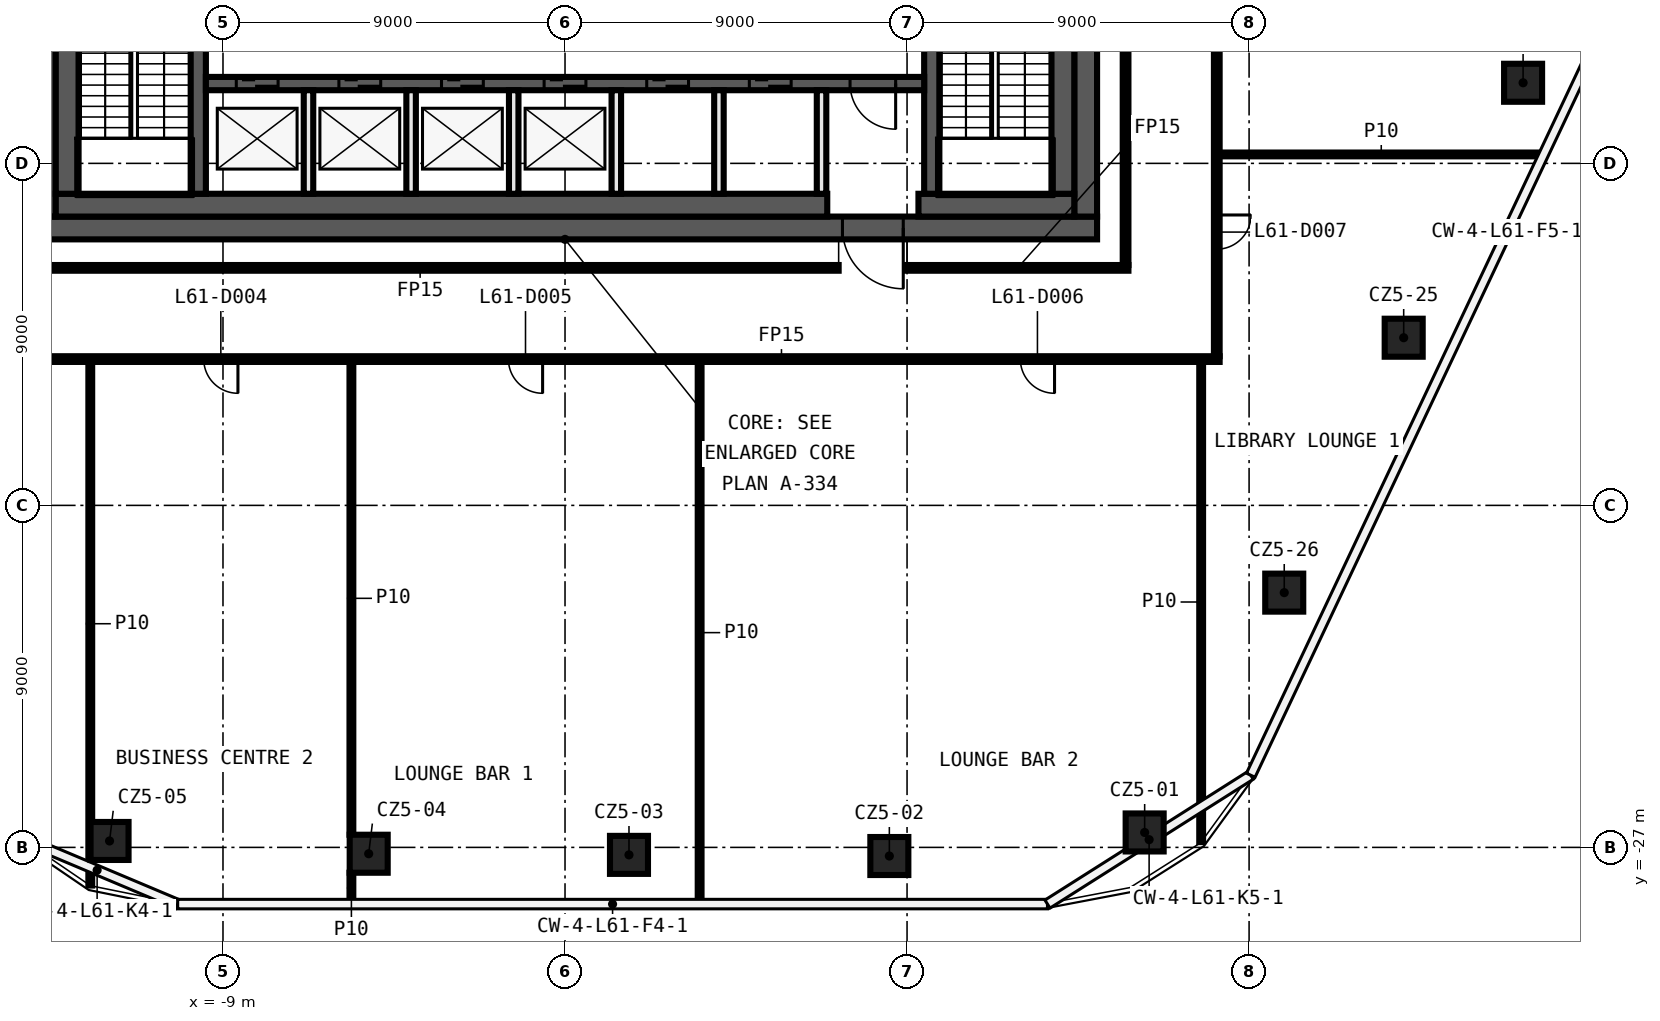
"""IFC4 building model, lengths in metres.
Left out: names, types, materials, properties, quantities, classifications, styles, units other than length and angle.
Written with IfcOpenShell. Run it as: python <this file> out.ifc"""

import sys

from ifc_helpers import new_model, si_unit, direction, frame, frame_2d, origin, origin_2d, place, context, subcontext, project, spatial, rectangle, extrude, element, fill, save


model = new_model("IFC4")
c1 = context("Model", 3, precision=1e-05, world=origin(), true_north=direction((0.0, 1.0)))
c2 = subcontext(c1, "Body", "Model", "MODEL_VIEW")
j1 = project(units=[si_unit("LENGTHUNIT", "METRE"), si_unit("PLANEANGLEUNIT", "RADIAN")], contexts=[c1])
p1 = place(None, origin())
s1 = spatial("IfcSite", under=j1, at=p1, CompositionType="ELEMENT")
p2 = place(p1, origin())
s2 = spatial("IfcBuilding", under=s1, at=p2, CompositionType="ELEMENT")
p3 = place(p2, frame((0.0, 0.0, 289.2)))
s3 = spatial("IfcBuildingStorey", under=s2, at=p3, CompositionType="ELEMENT", Elevation=289.2)
for number, where, z_axis, x_axis in (
    (1, (15.252, -26.607, 0.0), (0.0, 0.0, 1.0), (1.0, 0.0, 0.0)),
    (2, (8.534, -27.227, 0.0), (0.0, 0.0, 1.0), (1.0, 0.0, 0.0)),
    (3, (1.683, -27.197, 0.0), (0.0, 0.0, 1.0), (1.0, 0.0, 0.0)),
    (4, (-5.166, -27.167, 0.0), (0.0, 0.0, 1.0), (1.0, 0.0, 0.0)),
    (5, (-11.985, -26.831, 0.0), (0.0, 0.0, 1.0), (1.0, 0.0, 0.0)),
    (6, (25.21, -6.879, 0.0), (0.0, 0.0, 1.0), (1.0, 0.0, 0.0)),
    (7, (22.068, -13.588, 0.0), (0.0, 0.0, 1.0), (1.0, 0.0, 0.0)),
    (8, (18.925, -20.296, 0.0), (0.0, 0.0, 1.0), (1.0, 0.0, 0.0)),
):
    element("IfcColumn", number, at=place(p3, frame(where, z_axis=z_axis, x_axis=x_axis)), inside=s3, PredefinedType="COLUMN", context=c2, shape_type="SweptSolid", body=[
        extrude(rectangle(XDim=1.0, YDim=1.0, at=origin_2d()), origin(), (0.0, 0.0, 1.0), 4.62),
    ])
p4 = place(p3, frame((17.225, -14.15, 0.0), z_axis=(0.0, 0.0, 1.0), x_axis=(-1.0, 0.0, 0.0)))
e9 = element("IfcWall", 9, at=p4, inside=s3, PredefinedType="PARTITIONING", context=c2, shape_type="SweptSolid", body=[
    extrude(rectangle(XDim=34.45, YDim=0.15, at=frame_2d((17.225, 0.0))), origin(), (0.0, 0.0, 1.0), 4.62),
])
p5 = place(p4, frame((31.596, 0.0, 0.0)))
e10 = element("IfcOpeningElement", 10, at=p5, cuts=e9, PredefinedType="OPENING", context=c2, shape_type="SweptSolid", body=[
    extrude(rectangle(XDim=0.9, YDim=2.1, at=frame_2d((0.45, 1.05))), frame((0.0, 0.085, 0.0), z_axis=(0.0, -1.0, 0.0), x_axis=(1.0, 0.0, 0.0)), (0.0, 0.0, 1.0), 0.17),
])
p6 = place(p4, frame((25.832, 0.0, 0.0)))
e11 = element("IfcOpeningElement", 11, at=p6, cuts=e9, PredefinedType="OPENING", context=c2, shape_type="SweptSolid", body=[
    extrude(rectangle(XDim=0.9, YDim=2.1, at=frame_2d((0.45, 1.05))), frame((0.0, 0.085, 0.0), z_axis=(0.0, -1.0, 0.0), x_axis=(1.0, 0.0, 0.0)), (0.0, 0.0, 1.0), 0.17),
])
p7 = place(p4, frame((17.815, 0.0, 0.0)))
e12 = element("IfcOpeningElement", 12, at=p7, cuts=e9, PredefinedType="OPENING", context=c2, shape_type="SweptSolid", body=[
    extrude(rectangle(XDim=0.9, YDim=2.1, at=frame_2d((0.45, 1.05))), frame((0.0, 0.085, 0.0), z_axis=(0.0, -1.0, 0.0), x_axis=(1.0, 0.0, 0.0)), (0.0, 0.0, 1.0), 0.17),
])
p8 = place(p4, frame((4.344, 0.0, 0.0)))
e13 = element("IfcOpeningElement", 13, at=p8, cuts=e9, PredefinedType="OPENING", context=c2, shape_type="SweptSolid", body=[
    extrude(rectangle(XDim=0.9, YDim=2.1, at=frame_2d((0.45, 1.05))), frame((0.0, 0.085, 0.0), z_axis=(0.0, -1.0, 0.0), x_axis=(1.0, 0.0, 0.0)), (0.0, 0.0, 1.0), 0.17),
])
p9 = place(p3, frame((-14.825, -11.75, 0.0), z_axis=(0.0, 0.0, 1.0), x_axis=(1.0, 0.0, 0.0)))
e14 = element("IfcWall", 14, at=p9, inside=s3, PredefinedType="PARTITIONING", context=c2, shape_type="SweptSolid", body=[
    extrude(rectangle(XDim=22.025, YDim=0.15, at=frame_2d((11.012, 0.0))), origin(), (0.0, 0.0, 1.0), 4.62),
])
p10 = place(p3, frame((9.0, -11.75, 0.0), z_axis=(0.0, 0.0, 1.0), x_axis=(1.0, 0.0, 0.0)))
e15 = element("IfcWall", 15, at=p10, inside=s3, PredefinedType="PARTITIONING", context=c2, shape_type="SweptSolid", body=[
    extrude(rectangle(XDim=5.825, YDim=0.15, at=frame_2d((2.913, 0.0))), origin(), (0.0, 0.0, 1.0), 4.62),
])
p11 = place(p3, frame((17.225, -8.765, 0.0), z_axis=(0.0, 0.0, 1.0), x_axis=(1.0, 0.0, 0.0)))
e16 = element("IfcWall", 16, at=p11, inside=s3, PredefinedType="PARTITIONING", context=c2, shape_type="SweptSolid", body=[
    extrude(rectangle(XDim=8.505, YDim=0.1, at=frame_2d((4.253, 0.0))), origin(), (0.0, 0.0, 1.0), 4.62),
])
p12 = place(p3, frame((17.15, 14.075, 0.0), z_axis=(0.0, 0.0, 1.0), x_axis=(0.0, -1.0, 0.0)))
e17 = element("IfcWall", 17, at=p12, inside=s3, PredefinedType="PARTITIONING", context=c2, shape_type="SweptSolid", body=[
    extrude(rectangle(XDim=28.15, YDim=0.15, at=frame_2d((14.075, 0.0))), origin(), (0.0, 0.0, 1.0), 4.62),
])
p13 = place(p12, frame((24.433, 0.0, 0.0)))
e18 = element("IfcOpeningElement", 18, at=p13, cuts=e17, PredefinedType="OPENING", context=c2, shape_type="SweptSolid", body=[
    extrude(rectangle(XDim=0.9, YDim=2.1, at=frame_2d((0.45, 1.05))), frame((0.0, 0.085, 0.0), z_axis=(0.0, -1.0, 0.0), x_axis=(1.0, 0.0, 0.0)), (0.0, 0.0, 1.0), 0.17),
])
p14 = place(p12, frame((18.304, 0.0, 0.0)))
e19 = element("IfcOpeningElement", 19, at=p14, cuts=e17, PredefinedType="OPENING", context=c2, shape_type="SweptSolid", body=[
    extrude(rectangle(XDim=0.9, YDim=2.1, at=frame_2d((0.45, 1.05))), frame((0.0, 0.085, 0.0), z_axis=(0.0, -1.0, 0.0), x_axis=(1.0, 0.0, 0.0)), (0.0, 0.0, 1.0), 0.17),
])
p15 = place(p3, frame((16.739, -26.86, 0.0), z_axis=(0.0, 0.0, 1.0), x_axis=(0.0, 1.0, 0.0)))
e20 = element("IfcWall", 20, at=p15, inside=s3, PredefinedType="PARTITIONING", context=c2, shape_type="SweptSolid", body=[
    extrude(rectangle(XDim=12.635, YDim=0.1, at=frame_2d((6.318, 0.0))), origin(), (0.0, 0.0, 1.0), 4.62),
])
p16 = place(p3, frame((14.75, -11.675, 0.0), z_axis=(0.0, 0.0, 1.0), x_axis=(0.0, 1.0, 0.0)))
e21 = element("IfcWall", 21, at=p16, inside=s3, PredefinedType="PARTITIONING", context=c2, shape_type="SweptSolid", body=[
    extrude(rectangle(XDim=23.35, YDim=0.15, at=frame_2d((11.675, 0.0))), origin(), (0.0, 0.0, 1.0), 4.62),
])
p17 = place(p16, frame((11.225, 0.0, 0.0)))
e22 = element("IfcOpeningElement", 22, at=p17, cuts=e21, PredefinedType="OPENING", context=c2, shape_type="SweptSolid", body=[
    extrude(rectangle(XDim=0.9, YDim=2.1, at=frame_2d((0.45, 1.05))), frame((0.0, 0.085, 0.0), z_axis=(0.0, -1.0, 0.0), x_axis=(1.0, 0.0, 0.0)), (0.0, 0.0, 1.0), 0.17),
])
p18 = place(p3, frame((3.542, -28.472, 0.0), z_axis=(0.0, 0.0, 1.0), x_axis=(0.0, 1.0, 0.0)))
e23 = element("IfcWall", 23, at=p18, inside=s3, PredefinedType="PARTITIONING", context=c2, shape_type="SweptSolid", body=[
    extrude(rectangle(XDim=14.247, YDim=0.1, at=frame_2d((7.124, 0.0))), origin(), (0.0, 0.0, 1.0), 4.62),
])
p19 = place(p3, frame((-5.621, -28.472, 0.0), z_axis=(0.0, 0.0, 1.0), x_axis=(0.0, 1.0, 0.0)))
e24 = element("IfcWall", 24, at=p19, inside=s3, PredefinedType="PARTITIONING", context=c2, shape_type="SweptSolid", body=[
    extrude(rectangle(XDim=0.805, YDim=0.1, at=frame_2d((0.403, 0.0))), origin(), (0.0, 0.0, 1.0), 4.62),
])
p20 = place(p3, frame((-5.621, -26.667, 0.0), z_axis=(0.0, 0.0, 1.0), x_axis=(0.0, 1.0, 0.0)))
e25 = element("IfcWall", 25, at=p20, inside=s3, PredefinedType="PARTITIONING", context=c2, shape_type="SweptSolid", body=[
    extrude(rectangle(XDim=12.442, YDim=0.1, at=frame_2d((6.221, 0.0))), origin(), (0.0, 0.0, 1.0), 4.62),
])
p21 = place(p3, frame((-12.492, -28.004, 0.0), z_axis=(0.0, 0.0, 1.0), x_axis=(0.0, 1.0, 0.0)))
e26 = element("IfcWall", 26, at=p21, inside=s3, PredefinedType="PARTITIONING", context=c2, shape_type="SweptSolid", body=[
    extrude(rectangle(XDim=13.779, YDim=0.1, at=frame_2d((6.889, 0.0))), origin(), (0.0, 0.0, 1.0), 4.62),
])
p22 = place(p3, frame((14.0, -10.7, 0.0), z_axis=(0.0, 0.0, 1.0), x_axis=(-1.0, 0.0, 0.0)))
e27 = element("IfcWall", 27, at=p22, inside=s3, PredefinedType="SHEAR", context=c2, shape_type="SweptSolid", body=[
    extrude(rectangle(XDim=28.0, YDim=0.6, at=frame_2d((14.0, 0.0))), origin(), (0.0, 0.0, 1.0), 4.62),
])
p23 = place(p22, frame((5.1, 0.0, 0.0)))
e28 = element("IfcOpeningElement", 28, at=p23, cuts=e27, PredefinedType="OPENING", context=c2, shape_type="SweptSolid", body=[
    extrude(rectangle(XDim=1.6, YDim=2.1, at=frame_2d((0.8, 1.05))), frame((0.0, 0.31, 0.0), z_axis=(0.0, -1.0, 0.0), x_axis=(1.0, 0.0, 0.0)), (0.0, 0.0, 1.0), 0.62),
])
for number, where, z_axis, x_axis in (
    (29, (13.7, 10.4, 0.0), (0.0, 0.0, 1.0), (0.0, -1.0, 0.0)),
    (30, (-13.7, -10.4, 0.0), (0.0, 0.0, 1.0), (0.0, 1.0, 0.0)),
):
    element("IfcWall", number, at=place(p3, frame(where, z_axis=z_axis, x_axis=x_axis)), inside=s3, PredefinedType="SHEAR", context=c2, shape_type="SweptSolid", body=[
        extrude(rectangle(XDim=20.8, YDim=0.6, at=frame_2d((10.4, 0.0))), origin(), (0.0, 0.0, 1.0), 4.62),
    ])
p24 = place(p3, frame((13.4, -10.1, 0.0), z_axis=(0.0, 0.0, 1.0), x_axis=(-1.0, 0.0, 0.0)))
e31 = element("IfcWall", 31, at=p24, inside=s3, PredefinedType="SHEAR", context=c2, shape_type="SweptSolid", body=[
    extrude(rectangle(XDim=4.1, YDim=0.6, at=frame_2d((2.05, 0.0))), origin(), (0.0, 0.0, 1.0), 4.62),
])
p25 = place(p3, frame((6.9, -10.1, 0.0), z_axis=(0.0, 0.0, 1.0), x_axis=(-1.0, 0.0, 0.0)))
e32 = element("IfcWall", 32, at=p25, inside=s3, PredefinedType="SHEAR", context=c2, shape_type="SweptSolid", body=[
    extrude(rectangle(XDim=20.3, YDim=0.6, at=frame_2d((10.15, 0.0))), origin(), (0.0, 0.0, 1.0), 4.62),
])
for number, where, z_axis, x_axis in (
    (33, (13.1, 9.8, 0.0), (0.0, 0.0, 1.0), (0.0, -1.0, 0.0)),
    (34, (-13.1, -9.8, 0.0), (0.0, 0.0, 1.0), (0.0, 1.0, 0.0)),
):
    element("IfcWall", number, at=place(p3, frame(where, z_axis=z_axis, x_axis=x_axis)), inside=s3, PredefinedType="SHEAR", context=c2, shape_type="SweptSolid", body=[
        extrude(rectangle(XDim=19.6, YDim=0.6, at=frame_2d((9.8, 0.0))), origin(), (0.0, 0.0, 1.0), 4.62),
    ])
p26 = place(p3, frame((9.65, -2.3, 0.0), z_axis=(0.0, 0.0, 1.0), x_axis=(0.0, -1.0, 0.0)))
e35 = element("IfcWall", 35, at=p26, inside=s3, PredefinedType="SHEAR", context=c2, shape_type="SweptSolid", body=[
    extrude(rectangle(XDim=7.5, YDim=0.4, at=frame_2d((3.75, 0.0))), origin(), (0.0, 0.0, 1.0), 4.62),
])
p27 = place(p26, frame((1.2, 0.0, 0.0)))
e36 = element("IfcOpeningElement", 36, at=p27, cuts=e35, PredefinedType="OPENING", context=c2, shape_type="SweptSolid", body=[
    extrude(rectangle(XDim=1.2, YDim=2.1, at=frame_2d((0.6, 1.05))), frame((0.0, 0.21, 0.0), z_axis=(0.0, -1.0, 0.0), x_axis=(1.0, 0.0, 0.0)), (0.0, 0.0, 1.0), 0.42),
])
p28 = place(p3, frame((-9.65, -9.8, 0.0), z_axis=(0.0, 0.0, 1.0), x_axis=(0.0, 1.0, 0.0)))
e37 = element("IfcWall", 37, at=p28, inside=s3, PredefinedType="SHEAR", context=c2, shape_type="SweptSolid", body=[
    extrude(rectangle(XDim=7.5, YDim=0.4, at=frame_2d((3.75, 0.0))), origin(), (0.0, 0.0, 1.0), 4.62),
])
p29 = place(p28, frame((5.1, 0.0, 0.0)))
e38 = element("IfcOpeningElement", 38, at=p29, cuts=e37, PredefinedType="OPENING", context=c2, shape_type="SweptSolid", body=[
    extrude(rectangle(XDim=1.2, YDim=2.1, at=frame_2d((0.6, 1.05))), frame((0.0, 0.21, 0.0), z_axis=(0.0, -1.0, 0.0), x_axis=(1.0, 0.0, 0.0)), (0.0, 0.0, 1.0), 0.42),
])
p30 = place(p3, frame((9.45, -6.9, 0.0), z_axis=(0.0, 0.0, 1.0), x_axis=(-1.0, 0.0, 0.0)))
e39 = element("IfcWall", 39, at=p30, inside=s3, PredefinedType="SHEAR", context=c2, shape_type="SweptSolid", body=[
    extrude(rectangle(XDim=18.9, YDim=0.35, at=frame_2d((9.45, 0.0))), origin(), (0.0, 0.0, 1.0), 4.62),
])
p31 = place(p30, frame((17.0, 0.0, 0.0)))
e40 = element("IfcOpeningElement", 40, at=p31, cuts=e39, PredefinedType="OPENING", context=c2, shape_type="SweptSolid", body=[
    extrude(rectangle(XDim=1.1, YDim=2.1, at=frame_2d((0.55, 1.05))), frame((0.0, 0.185, 0.0), z_axis=(0.0, -1.0, 0.0), x_axis=(1.0, 0.0, 0.0)), (0.0, 0.0, 1.0), 0.37),
])
p32 = place(p30, frame((14.3, 0.0, 0.0)))
e41 = element("IfcOpeningElement", 41, at=p32, cuts=e39, PredefinedType="OPENING", context=c2, shape_type="SweptSolid", body=[
    extrude(rectangle(XDim=1.1, YDim=2.1, at=frame_2d((0.55, 1.05))), frame((0.0, 0.185, 0.0), z_axis=(0.0, -1.0, 0.0), x_axis=(1.0, 0.0, 0.0)), (0.0, 0.0, 1.0), 0.37),
])
p33 = place(p30, frame((11.6, 0.0, 0.0)))
e42 = element("IfcOpeningElement", 42, at=p33, cuts=e39, PredefinedType="OPENING", context=c2, shape_type="SweptSolid", body=[
    extrude(rectangle(XDim=1.1, YDim=2.1, at=frame_2d((0.55, 1.05))), frame((0.0, 0.185, 0.0), z_axis=(0.0, -1.0, 0.0), x_axis=(1.0, 0.0, 0.0)), (0.0, 0.0, 1.0), 0.37),
])
p34 = place(p30, frame((8.9, 0.0, 0.0)))
e43 = element("IfcOpeningElement", 43, at=p34, cuts=e39, PredefinedType="OPENING", context=c2, shape_type="SweptSolid", body=[
    extrude(rectangle(XDim=1.1, YDim=2.1, at=frame_2d((0.55, 1.05))), frame((0.0, 0.185, 0.0), z_axis=(0.0, -1.0, 0.0), x_axis=(1.0, 0.0, 0.0)), (0.0, 0.0, 1.0), 0.37),
])
p35 = place(p30, frame((6.2, 0.0, 0.0)))
e44 = element("IfcOpeningElement", 44, at=p35, cuts=e39, PredefinedType="OPENING", context=c2, shape_type="SweptSolid", body=[
    extrude(rectangle(XDim=1.1, YDim=2.1, at=frame_2d((0.55, 1.05))), frame((0.0, 0.185, 0.0), z_axis=(0.0, -1.0, 0.0), x_axis=(1.0, 0.0, 0.0)), (0.0, 0.0, 1.0), 0.37),
])
p36 = place(p30, frame((3.5, 0.0, 0.0)))
e45 = element("IfcOpeningElement", 45, at=p36, cuts=e39, PredefinedType="OPENING", context=c2, shape_type="SweptSolid", body=[
    extrude(rectangle(XDim=1.1, YDim=2.1, at=frame_2d((0.55, 1.05))), frame((0.0, 0.185, 0.0), z_axis=(0.0, -1.0, 0.0), x_axis=(1.0, 0.0, 0.0)), (0.0, 0.0, 1.0), 0.37),
])
p37 = place(p30, frame((0.75, 0.0, 0.0)))
e46 = element("IfcOpeningElement", 46, at=p37, cuts=e39, PredefinedType="OPENING", context=c2, shape_type="SweptSolid", body=[
    extrude(rectangle(XDim=1.2, YDim=2.1, at=frame_2d((0.6, 1.05))), frame((0.0, 0.185, 0.0), z_axis=(0.0, -1.0, 0.0), x_axis=(1.0, 0.0, 0.0)), (0.0, 0.0, 1.0), 0.37),
])
for number, where, z_axis, x_axis in (
    (47, (6.75, -9.8, 0.0), (0.0, 0.0, 1.0), (0.0, 1.0, 0.0)),
    (48, (4.05, -9.8, 0.0), (0.0, 0.0, 1.0), (0.0, 1.0, 0.0)),
    (49, (1.35, -9.8, 0.0), (0.0, 0.0, 1.0), (0.0, 1.0, 0.0)),
    (50, (-1.35, -9.8, 0.0), (0.0, 0.0, 1.0), (0.0, 1.0, 0.0)),
    (51, (-4.05, -9.8, 0.0), (0.0, 0.0, 1.0), (0.0, 1.0, 0.0)),
    (52, (-6.75, -9.8, 0.0), (0.0, 0.0, 1.0), (0.0, 1.0, 0.0)),
):
    element("IfcWall", number, at=place(p3, frame(where, z_axis=z_axis, x_axis=x_axis)), inside=s3, PredefinedType="SOLIDWALL", context=c2, shape_type="SweptSolid", body=[
        extrude(rectangle(XDim=2.725, YDim=0.25, at=frame_2d((1.363, 0.0))), origin(), (0.0, 0.0, 1.0), 4.62),
    ])
p38 = place(p6, origin())
e53 = element("IfcDoor", 53, at=p38, inside=s3, OperationType="SINGLE_SWING_LEFT", PredefinedType="DOOR", context=c2, shape_type="SweptSolid", body=[
    extrude(rectangle(XDim=0.9, YDim=2.1, at=frame_2d((0.45, 1.05))), frame((0.0, 0.025, 0.0), z_axis=(0.0, -1.0, 0.0), x_axis=(1.0, 0.0, 0.0)), (0.0, 0.0, 1.0), 0.05),
])
fill(e11, e53)
p39 = place(p7, origin())
e54 = element("IfcDoor", 54, at=p39, inside=s3, OperationType="SINGLE_SWING_RIGHT", PredefinedType="DOOR", context=c2, shape_type="SweptSolid", body=[
    extrude(rectangle(XDim=0.9, YDim=2.1, at=frame_2d((0.45, 1.05))), frame((0.0, 0.025, 0.0), z_axis=(0.0, -1.0, 0.0), x_axis=(1.0, 0.0, 0.0)), (0.0, 0.0, 1.0), 0.05),
])
fill(e12, e54)
p40 = place(p8, origin())
e55 = element("IfcDoor", 55, at=p40, inside=s3, OperationType="SINGLE_SWING_LEFT", PredefinedType="DOOR", context=c2, shape_type="SweptSolid", body=[
    extrude(rectangle(XDim=0.9, YDim=2.1, at=frame_2d((0.45, 1.05))), frame((0.0, 0.025, 0.0), z_axis=(0.0, -1.0, 0.0), x_axis=(1.0, 0.0, 0.0)), (0.0, 0.0, 1.0), 0.05),
])
fill(e13, e55)
p41 = place(p13, origin())
e56 = element("IfcDoor", 56, at=p41, inside=s3, OperationType="SINGLE_SWING_RIGHT", PredefinedType="DOOR", context=c2, shape_type="SweptSolid", body=[
    extrude(rectangle(XDim=0.9, YDim=2.1, at=frame_2d((0.45, 1.05))), frame((0.0, 0.025, 0.0), z_axis=(0.0, -1.0, 0.0), x_axis=(1.0, 0.0, 0.0)), (0.0, 0.0, 1.0), 0.05),
])
fill(e18, e56)
p42 = place(p31, origin())
e57 = element("IfcDoor", 57, at=p42, inside=s3, OperationType="DOUBLE_DOOR_SLIDING", PredefinedType="DOOR", context=c2, shape_type="SweptSolid", body=[
    extrude(rectangle(XDim=1.1, YDim=2.1, at=frame_2d((0.55, 1.05))), frame((0.0, 0.025, 0.0), z_axis=(0.0, -1.0, 0.0), x_axis=(1.0, 0.0, 0.0)), (0.0, 0.0, 1.0), 0.05),
])
fill(e40, e57)
p43 = place(p32, origin())
e58 = element("IfcDoor", 58, at=p43, inside=s3, OperationType="DOUBLE_DOOR_SLIDING", PredefinedType="DOOR", context=c2, shape_type="SweptSolid", body=[
    extrude(rectangle(XDim=1.1, YDim=2.1, at=frame_2d((0.55, 1.05))), frame((0.0, 0.025, 0.0), z_axis=(0.0, -1.0, 0.0), x_axis=(1.0, 0.0, 0.0)), (0.0, 0.0, 1.0), 0.05),
])
fill(e41, e58)
p44 = place(p33, origin())
e59 = element("IfcDoor", 59, at=p44, inside=s3, OperationType="DOUBLE_DOOR_SLIDING", PredefinedType="DOOR", context=c2, shape_type="SweptSolid", body=[
    extrude(rectangle(XDim=1.1, YDim=2.1, at=frame_2d((0.55, 1.05))), frame((0.0, 0.025, 0.0), z_axis=(0.0, -1.0, 0.0), x_axis=(1.0, 0.0, 0.0)), (0.0, 0.0, 1.0), 0.05),
])
fill(e42, e59)
p45 = place(p34, origin())
e60 = element("IfcDoor", 60, at=p45, inside=s3, OperationType="DOUBLE_DOOR_SLIDING", PredefinedType="DOOR", context=c2, shape_type="SweptSolid", body=[
    extrude(rectangle(XDim=1.1, YDim=2.1, at=frame_2d((0.55, 1.05))), frame((0.0, 0.025, 0.0), z_axis=(0.0, -1.0, 0.0), x_axis=(1.0, 0.0, 0.0)), (0.0, 0.0, 1.0), 0.05),
])
fill(e43, e60)
p46 = place(p35, origin())
e61 = element("IfcDoor", 61, at=p46, inside=s3, OperationType="DOUBLE_DOOR_SLIDING", PredefinedType="DOOR", context=c2, shape_type="SweptSolid", body=[
    extrude(rectangle(XDim=1.1, YDim=2.1, at=frame_2d((0.55, 1.05))), frame((0.0, 0.025, 0.0), z_axis=(0.0, -1.0, 0.0), x_axis=(1.0, 0.0, 0.0)), (0.0, 0.0, 1.0), 0.05),
])
fill(e44, e61)
p47 = place(p36, origin())
e62 = element("IfcDoor", 62, at=p47, inside=s3, OperationType="DOUBLE_DOOR_SLIDING", PredefinedType="DOOR", context=c2, shape_type="SweptSolid", body=[
    extrude(rectangle(XDim=1.1, YDim=2.1, at=frame_2d((0.55, 1.05))), frame((0.0, 0.025, 0.0), z_axis=(0.0, -1.0, 0.0), x_axis=(1.0, 0.0, 0.0)), (0.0, 0.0, 1.0), 0.05),
])
fill(e45, e62)
p48 = place(p23, origin())
e63 = element("IfcDoor", 63, at=p48, inside=s3, OperationType="DOUBLE_DOOR_SINGLE_SWING", PredefinedType="DOOR", context=c2, shape_type="SweptSolid", body=[
    extrude(rectangle(XDim=1.6, YDim=2.1, at=frame_2d((0.8, 1.05))), frame((0.0, 0.025, 0.0), z_axis=(0.0, -1.0, 0.0), x_axis=(1.0, 0.0, 0.0)), (0.0, 0.0, 1.0), 0.05),
])
fill(e28, e63)
p49 = place(p37, origin())
e64 = element("IfcDoor", 64, at=p49, inside=s3, OperationType="SINGLE_SWING_LEFT", PredefinedType="DOOR", context=c2, shape_type="SweptSolid", body=[
    extrude(rectangle(XDim=1.2, YDim=2.1, at=frame_2d((0.6, 1.05))), frame((0.0, 0.025, 0.0), z_axis=(0.0, -1.0, 0.0), x_axis=(1.0, 0.0, 0.0)), (0.0, 0.0, 1.0), 0.05),
])
fill(e46, e64)
save(model, sys.argv[1])
